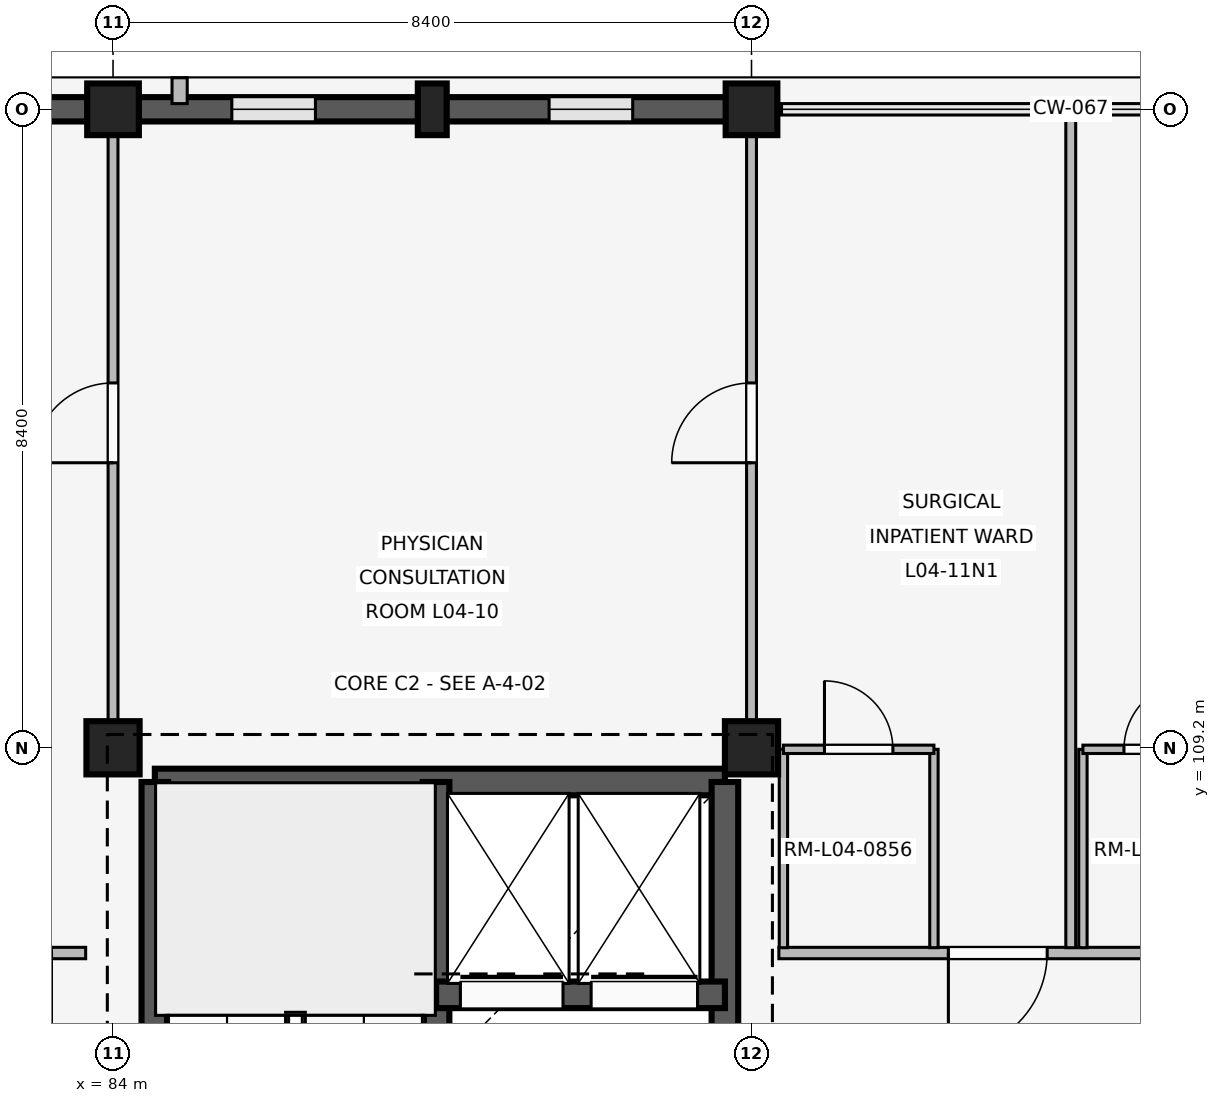
"""IFC4 building model, lengths in metres.
Left out: names, types, materials, properties, quantities, classifications, styles, units other than length and angle.
Written with IfcOpenShell. Run it as: python <this file> out.ifc"""

import sys

from ifc_helpers import new_model, si_unit, direction, frame, frame_2d, origin, origin_2d, place, context, subcontext, project, spatial, rectangle, extrude, element, fill, save


model = new_model("IFC4")
c1 = context("Model", 3, precision=1e-05, world=origin(), true_north=direction((0.0, 1.0)))
c2 = subcontext(c1, "Body", "Model", "MODEL_VIEW")
j1 = project(units=[si_unit("LENGTHUNIT", "METRE"), si_unit("PLANEANGLEUNIT", "RADIAN")], contexts=[c1])
p1 = place(None, origin())
s1 = spatial("IfcSite", under=j1, at=p1, CompositionType="ELEMENT")
p2 = place(p1, origin())
s2 = spatial("IfcBuilding", under=s1, at=p2, CompositionType="ELEMENT")
p3 = place(p2, frame((0.0, 0.0, 16.2)))
s3 = spatial("IfcBuildingStorey", under=s2, at=p3, CompositionType="ELEMENT", Elevation=16.2)
p4 = place(p3, frame((84.0, 109.2, 0.0), z_axis=(0.0, 0.0, 1.0), x_axis=(1.0, 0.0, 0.0)))
e1 = element("IfcColumn", 1, at=p4, inside=s3, PredefinedType="COLUMN", context=c2, shape_type="SweptSolid", body=[
    extrude(rectangle(XDim=0.7, YDim=0.7, at=origin_2d()), origin(), (0.0, 0.0, 1.0), 4.2),
])
p5 = place(p3, frame((84.0, 117.6, 0.0), z_axis=(0.0, 0.0, 1.0), x_axis=(1.0, 0.0, 0.0)))
e2 = element("IfcColumn", 2, at=p5, inside=s3, PredefinedType="COLUMN", context=c2, shape_type="SweptSolid", body=[
    extrude(rectangle(XDim=0.68, YDim=0.68, at=origin_2d()), origin(), (0.0, 0.0, 1.0), 4.2),
])
p6 = place(p3, frame((92.4, 109.2, 0.0), z_axis=(0.0, 0.0, 1.0), x_axis=(1.0, 0.0, 0.0)))
e3 = element("IfcColumn", 3, at=p6, inside=s3, PredefinedType="COLUMN", context=c2, shape_type="SweptSolid", body=[
    extrude(rectangle(XDim=0.7, YDim=0.7, at=origin_2d()), origin(), (0.0, 0.0, 1.0), 4.2),
])
p7 = place(p3, frame((92.4, 117.6, 0.0), z_axis=(0.0, 0.0, 1.0), x_axis=(1.0, 0.0, 0.0)))
e4 = element("IfcColumn", 4, at=p7, inside=s3, PredefinedType="COLUMN", context=c2, shape_type="SweptSolid", body=[
    extrude(rectangle(XDim=0.68, YDim=0.68, at=origin_2d()), origin(), (0.0, 0.0, 1.0), 4.2),
])
p8 = place(p3, frame((88.2, 117.6, 0.0), z_axis=(0.0, 0.0, 1.0), x_axis=(1.0, 0.0, 0.0)))
e5 = element("IfcColumn", 5, at=p8, inside=s3, PredefinedType="PILASTER", context=c2, shape_type="SweptSolid", body=[
    extrude(rectangle(XDim=0.38, YDim=0.68, at=origin_2d()), origin(), (0.0, 0.0, 1.0), 4.2),
])
p9 = place(p3, frame((75.935, 117.6, 0.0), z_axis=(0.0, 0.0, 1.0), x_axis=(1.0, 0.0, 0.0)))
e6 = element("IfcWall", 6, at=p9, inside=s3, PredefinedType="SOLIDWALL", context=c2, shape_type="SweptSolid", body=[
    extrude(rectangle(XDim=7.73, YDim=0.32, at=frame_2d((3.865, 0.0))), origin(), (0.0, 0.0, 1.0), 3.32),
])
p10 = place(p9, frame((1.303, 0.0, 0.85)))
e7 = element("IfcOpeningElement", 7, at=p10, cuts=e6, PredefinedType="OPENING", context=c2, shape_type="SweptSolid", body=[
    extrude(rectangle(XDim=0.95, YDim=1.6, at=frame_2d((0.475, 0.8))), frame((0.0, 0.17, 0.0), z_axis=(0.0, -1.0, 0.0), x_axis=(1.0, 0.0, 0.0)), (0.0, 0.0, 1.0), 0.34),
])
p11 = place(p9, frame((5.477, 0.0, 0.85)))
e8 = element("IfcOpeningElement", 8, at=p11, cuts=e6, PredefinedType="OPENING", context=c2, shape_type="SweptSolid", body=[
    extrude(rectangle(XDim=0.95, YDim=1.6, at=frame_2d((0.475, 0.8))), frame((0.0, 0.17, 0.0), z_axis=(0.0, -1.0, 0.0), x_axis=(1.0, 0.0, 0.0)), (0.0, 0.0, 1.0), 0.34),
])
p12 = place(p3, frame((84.335, 117.6, 0.0), z_axis=(0.0, 0.0, 1.0), x_axis=(1.0, 0.0, 0.0)))
e9 = element("IfcWall", 9, at=p12, inside=s3, PredefinedType="SOLIDWALL", context=c2, shape_type="SweptSolid", body=[
    extrude(rectangle(XDim=7.73, YDim=0.32, at=frame_2d((3.865, 0.0))), origin(), (0.0, 0.0, 1.0), 3.32),
])
p13 = place(p12, frame((1.228, 0.0, 0.85)))
e10 = element("IfcOpeningElement", 10, at=p13, cuts=e9, PredefinedType="OPENING", context=c2, shape_type="SweptSolid", body=[
    extrude(rectangle(XDim=1.1, YDim=1.6, at=frame_2d((0.55, 0.8))), frame((0.0, 0.17, 0.0), z_axis=(0.0, -1.0, 0.0), x_axis=(1.0, 0.0, 0.0)), (0.0, 0.0, 1.0), 0.34),
])
p14 = place(p12, frame((5.402, 0.0, 0.85)))
e11 = element("IfcOpeningElement", 11, at=p14, cuts=e9, PredefinedType="OPENING", context=c2, shape_type="SweptSolid", body=[
    extrude(rectangle(XDim=1.1, YDim=1.6, at=frame_2d((0.55, 0.8))), frame((0.0, 0.17, 0.0), z_axis=(0.0, -1.0, 0.0), x_axis=(1.0, 0.0, 0.0)), (0.0, 0.0, 1.0), 0.34),
])
p15 = place(p3, frame((84.876, 117.675, 0.0), z_axis=(0.0, 0.0, 1.0), x_axis=(0.0, 1.0, 0.0)))
e12 = element("IfcWall", 12, at=p15, inside=s3, PredefinedType="ELEMENTEDWALL", context=c2, shape_type="SweptSolid", body=[
    extrude(rectangle(XDim=0.34, YDim=0.2, at=frame_2d((0.17, 0.0))), origin(), (0.0, 0.0, 1.0), 3.3),
])
p16 = place(p3, frame((84.55, 108.75, 0.0), z_axis=(0.0, 0.0, 1.0), x_axis=(1.0, 0.0, 0.0)))
e13 = element("IfcWall", 13, at=p16, inside=s3, PredefinedType="SHEAR", context=c2, shape_type="SweptSolid", body=[
    extrude(rectangle(XDim=7.5, YDim=0.35, at=frame_2d((3.75, 0.0))), origin(), (0.0, 0.0, 1.0), 3.92),
])
p17 = place(p3, frame((84.55, 101.2, 0.0), z_axis=(0.0, 0.0, 1.0), x_axis=(0.0, 1.0, 0.0)))
e14 = element("IfcWall", 14, at=p17, inside=s3, PredefinedType="SHEAR", context=c2, shape_type="SweptSolid", body=[
    extrude(rectangle(XDim=7.55, YDim=0.35, at=frame_2d((3.775, 0.0))), origin(), (0.0, 0.0, 1.0), 3.92),
])
p18 = place(p17, frame((0.28, 0.0, 0.0)))
e15 = element("IfcOpeningElement", 15, at=p18, cuts=e14, PredefinedType="OPENING", context=c2, shape_type="SweptSolid", body=[
    extrude(rectangle(XDim=1.0, YDim=2.15, at=frame_2d((0.5, 1.075))), frame((0.0, 0.185, 0.0), z_axis=(0.0, -1.0, 0.0), x_axis=(1.0, 0.0, 0.0)), (0.0, 0.0, 1.0), 0.37),
])
p19 = place(p3, frame((92.05, 101.2, 0.0), z_axis=(0.0, 0.0, 1.0), x_axis=(0.0, 1.0, 0.0)))
e16 = element("IfcWall", 16, at=p19, inside=s3, PredefinedType="SHEAR", context=c2, shape_type="SweptSolid", body=[
    extrude(rectangle(XDim=7.55, YDim=0.35, at=frame_2d((3.775, 0.0))), origin(), (0.0, 0.0, 1.0), 3.92),
])
p20 = place(p19, frame((2.4, 0.0, 0.0)))
e17 = element("IfcOpeningElement", 17, at=p20, cuts=e16, PredefinedType="OPENING", context=c2, shape_type="SweptSolid", body=[
    extrude(rectangle(XDim=1.2, YDim=2.2, at=frame_2d((0.6, 1.1))), frame((0.0, 0.185, 0.0), z_axis=(0.0, -1.0, 0.0), x_axis=(1.0, 0.0, 0.0)), (0.0, 0.0, 1.0), 0.37),
])
p21 = place(p3, frame((88.25, 101.2, 0.0), z_axis=(0.0, 0.0, 1.0), x_axis=(0.0, 1.0, 0.0)))
e18 = element("IfcWall", 18, at=p21, inside=s3, PredefinedType="SHEAR", context=c2, shape_type="SweptSolid", body=[
    extrude(rectangle(XDim=7.55, YDim=0.35, at=frame_2d((3.775, 0.0))), origin(), (0.0, 0.0, 1.0), 3.92),
])
p22 = place(p21, frame((0.28, 0.0, 0.0)))
e19 = element("IfcOpeningElement", 19, at=p22, cuts=e18, PredefinedType="OPENING", context=c2, shape_type="SweptSolid", body=[
    extrude(rectangle(XDim=1.0, YDim=2.15, at=frame_2d((0.5, 1.075))), frame((0.0, 0.185, 0.0), z_axis=(0.0, -1.0, 0.0), x_axis=(1.0, 0.0, 0.0)), (0.0, 0.0, 1.0), 0.37),
])
p23 = place(p3, frame((88.25, 105.95, 0.0), z_axis=(0.0, 0.0, 1.0), x_axis=(1.0, 0.0, 0.0)))
e20 = element("IfcWall", 20, at=p23, inside=s3, PredefinedType="SHEAR", context=c2, shape_type="SweptSolid", body=[
    extrude(rectangle(XDim=3.8, YDim=0.35, at=frame_2d((1.9, 0.0))), origin(), (0.0, 0.0, 1.0), 3.92),
])
p24 = place(p23, frame((0.32, 0.0, 0.0)))
e21 = element("IfcOpeningElement", 21, at=p24, cuts=e20, PredefinedType="OPENING", context=c2, shape_type="SweptSolid", body=[
    extrude(rectangle(XDim=1.35, YDim=2.25, at=frame_2d((0.675, 1.125))), frame((0.0, 0.185, 0.0), z_axis=(0.0, -1.0, 0.0), x_axis=(1.0, 0.0, 0.0)), (0.0, 0.0, 1.0), 0.37),
])
p25 = place(p23, frame((2.04, 0.0, 0.0)))
e22 = element("IfcOpeningElement", 22, at=p25, cuts=e20, PredefinedType="OPENING", context=c2, shape_type="SweptSolid", body=[
    extrude(rectangle(XDim=1.4, YDim=2.25, at=frame_2d((0.7, 1.125))), frame((0.0, 0.185, 0.0), z_axis=(0.0, -1.0, 0.0), x_axis=(1.0, 0.0, 0.0)), (0.0, 0.0, 1.0), 0.37),
])
p26 = place(p3, frame((83.64, 106.5, 0.0), z_axis=(0.0, 0.0, 1.0), x_axis=(-1.0, 0.0, 0.0)))
e23 = element("IfcWall", 23, at=p26, inside=s3, PredefinedType="PARTITIONING", context=c2, shape_type="SweptSolid", body=[
    extrude(rectangle(XDim=7.96, YDim=0.15, at=frame_2d((3.98, 0.0))), origin(), (0.0, 0.0, 1.0), 3.3),
])
p27 = place(p26, frame((0.45, 0.0, 0.0)))
e24 = element("IfcOpeningElement", 24, at=p27, cuts=e23, PredefinedType="OPENING", context=c2, shape_type="SweptSolid", body=[
    extrude(rectangle(XDim=1.3, YDim=2.25, at=frame_2d((0.65, 1.125))), frame((0.0, 0.085, 0.0), z_axis=(0.0, -1.0, 0.0), x_axis=(1.0, 0.0, 0.0)), (0.0, 0.0, 1.0), 0.17),
])
p28 = place(p26, frame((4.15, 0.0, 0.0)))
e25 = element("IfcOpeningElement", 25, at=p28, cuts=e23, PredefinedType="OPENING", context=c2, shape_type="SweptSolid", body=[
    extrude(rectangle(XDim=1.3, YDim=2.25, at=frame_2d((0.65, 1.125))), frame((0.0, 0.085, 0.0), z_axis=(0.0, -1.0, 0.0), x_axis=(1.0, 0.0, 0.0)), (0.0, 0.0, 1.0), 0.17),
])
p29 = place(p3, frame((84.0, 109.55, 0.0), z_axis=(0.0, 0.0, 1.0), x_axis=(0.0, 1.0, 0.0)))
e26 = element("IfcWall", 26, at=p29, inside=s3, PredefinedType="PARTITIONING", context=c2, shape_type="SweptSolid", body=[
    extrude(rectangle(XDim=7.91, YDim=0.13, at=frame_2d((3.955, 0.0))), origin(), (0.0, 0.0, 1.0), 3.3),
])
p30 = place(p29, frame((3.4, 0.0, 0.0)))
e27 = element("IfcOpeningElement", 27, at=p30, cuts=e26, PredefinedType="OPENING", context=c2, shape_type="SweptSolid", body=[
    extrude(rectangle(XDim=1.05, YDim=2.2, at=frame_2d((0.525, 1.1))), frame((0.0, 0.075, 0.0), z_axis=(0.0, -1.0, 0.0), x_axis=(1.0, 0.0, 0.0)), (0.0, 0.0, 1.0), 0.15),
])
p31 = place(p3, frame((92.4, 109.55, 0.0), z_axis=(0.0, 0.0, 1.0), x_axis=(0.0, 1.0, 0.0)))
e28 = element("IfcWall", 28, at=p31, inside=s3, PredefinedType="PARTITIONING", context=c2, shape_type="SweptSolid", body=[
    extrude(rectangle(XDim=7.91, YDim=0.13, at=frame_2d((3.955, 0.0))), origin(), (0.0, 0.0, 1.0), 3.3),
])
p32 = place(p31, frame((3.4, 0.0, 0.0)))
e29 = element("IfcOpeningElement", 29, at=p32, cuts=e28, PredefinedType="OPENING", context=c2, shape_type="SweptSolid", body=[
    extrude(rectangle(XDim=1.05, YDim=2.2, at=frame_2d((0.525, 1.1))), frame((0.0, 0.075, 0.0), z_axis=(0.0, -1.0, 0.0), x_axis=(1.0, 0.0, 0.0)), (0.0, 0.0, 1.0), 0.15),
])
p33 = place(p3, frame((100.72, 106.5, 0.0), z_axis=(0.0, 0.0, 1.0), x_axis=(-1.0, 0.0, 0.0)))
e30 = element("IfcWall", 30, at=p33, inside=s3, PredefinedType="PARTITIONING", context=c2, shape_type="SweptSolid", body=[
    extrude(rectangle(XDim=7.96, YDim=0.15, at=frame_2d((3.98, 0.0))), origin(), (0.0, 0.0, 1.0), 3.3),
])
p34 = place(p33, frame((0.73, 0.0, 0.0)))
e31 = element("IfcOpeningElement", 31, at=p34, cuts=e30, PredefinedType="OPENING", context=c2, shape_type="SweptSolid", body=[
    extrude(rectangle(XDim=1.3, YDim=2.25, at=frame_2d((0.65, 1.125))), frame((0.0, 0.085, 0.0), z_axis=(0.0, -1.0, 0.0), x_axis=(1.0, 0.0, 0.0)), (0.0, 0.0, 1.0), 0.17),
])
p35 = place(p33, frame((4.43, 0.0, 0.0)))
e32 = element("IfcOpeningElement", 32, at=p35, cuts=e30, PredefinedType="OPENING", context=c2, shape_type="SweptSolid", body=[
    extrude(rectangle(XDim=1.3, YDim=2.25, at=frame_2d((0.65, 1.125))), frame((0.0, 0.085, 0.0), z_axis=(0.0, -1.0, 0.0), x_axis=(1.0, 0.0, 0.0)), (0.0, 0.0, 1.0), 0.17),
])
p36 = place(p3, frame((96.6, 106.57, 0.0), z_axis=(0.0, 0.0, 1.0), x_axis=(0.0, 1.0, 0.0)))
e33 = element("IfcWall", 33, at=p36, inside=s3, PredefinedType="PARTITIONING", context=c2, shape_type="SweptSolid", body=[
    extrude(rectangle(XDim=10.93, YDim=0.13, at=frame_2d((5.465, 0.0))), origin(), (0.0, 0.0, 1.0), 3.3),
])
for number, where, z_axis, x_axis in (
    (34, (92.82, 106.57, 0.0), (0.0, 0.0, 1.0), (0.0, 1.0, 0.0)),
    (35, (94.8, 106.57, 0.0), (0.0, 0.0, 1.0), (0.0, 1.0, 0.0)),
):
    element("IfcWall", number, at=place(p3, frame(where, z_axis=z_axis, x_axis=x_axis)), inside=s3, PredefinedType="PARTITIONING", context=c2, shape_type="SweptSolid", body=[
        extrude(rectangle(XDim=2.61, YDim=0.11, at=frame_2d((1.305, 0.0))), origin(), (0.0, 0.0, 1.0), 3.3),
    ])
p37 = place(p3, frame((92.82, 109.18, 0.0), z_axis=(0.0, 0.0, 1.0), x_axis=(1.0, 0.0, 0.0)))
e36 = element("IfcWall", 36, at=p37, inside=s3, PredefinedType="PARTITIONING", context=c2, shape_type="SweptSolid", body=[
    extrude(rectangle(XDim=1.98, YDim=0.11, at=frame_2d((0.99, 0.0))), origin(), (0.0, 0.0, 1.0), 3.3),
])
p38 = place(p37, frame((0.54, 0.0, 0.0)))
e37 = element("IfcOpeningElement", 37, at=p38, cuts=e36, PredefinedType="OPENING", context=c2, shape_type="SweptSolid", body=[
    extrude(rectangle(XDim=0.9, YDim=2.1, at=frame_2d((0.45, 1.05))), frame((0.0, 0.065, 0.0), z_axis=(0.0, -1.0, 0.0), x_axis=(1.0, 0.0, 0.0)), (0.0, 0.0, 1.0), 0.13),
])
p39 = place(p3, frame((96.76, 106.57, 0.0), z_axis=(0.0, 0.0, 1.0), x_axis=(0.0, 1.0, 0.0)))
e38 = element("IfcWall", 38, at=p39, inside=s3, PredefinedType="PARTITIONING", context=c2, shape_type="SweptSolid", body=[
    extrude(rectangle(XDim=2.61, YDim=0.11, at=frame_2d((1.305, 0.0))), origin(), (0.0, 0.0, 1.0), 3.3),
])
p40 = place(p3, frame((96.76, 109.18, 0.0), z_axis=(0.0, 0.0, 1.0), x_axis=(1.0, 0.0, 0.0)))
e39 = element("IfcWall", 39, at=p40, inside=s3, PredefinedType="PARTITIONING", context=c2, shape_type="SweptSolid", body=[
    extrude(rectangle(XDim=1.98, YDim=0.11, at=frame_2d((0.99, 0.0))), origin(), (0.0, 0.0, 1.0), 3.3),
])
p41 = place(p40, frame((0.54, 0.0, 0.0)))
e40 = element("IfcOpeningElement", 40, at=p41, cuts=e39, PredefinedType="OPENING", context=c2, shape_type="SweptSolid", body=[
    extrude(rectangle(XDim=0.9, YDim=2.1, at=frame_2d((0.45, 1.05))), frame((0.0, 0.065, 0.0), z_axis=(0.0, -1.0, 0.0), x_axis=(1.0, 0.0, 0.0)), (0.0, 0.0, 1.0), 0.13),
])
p42 = place(p13, origin())
e41 = element("IfcWindow", 41, at=p42, inside=s3, PartitioningType="SINGLE_PANEL", PredefinedType="WINDOW", context=c2, shape_type="SweptSolid", body=[
    extrude(rectangle(XDim=1.1, YDim=1.6, at=frame_2d((0.55, 0.8))), frame((0.0, 0.03, 0.0), z_axis=(0.0, -1.0, 0.0), x_axis=(1.0, 0.0, 0.0)), (0.0, 0.0, 1.0), 0.06),
])
fill(e10, e41)
p43 = place(p14, origin())
e42 = element("IfcWindow", 42, at=p43, inside=s3, PartitioningType="SINGLE_PANEL", PredefinedType="WINDOW", context=c2, shape_type="SweptSolid", body=[
    extrude(rectangle(XDim=1.1, YDim=1.6, at=frame_2d((0.55, 0.8))), frame((0.0, 0.03, 0.0), z_axis=(0.0, -1.0, 0.0), x_axis=(1.0, 0.0, 0.0)), (0.0, 0.0, 1.0), 0.06),
])
fill(e11, e42)
p44 = place(p24, origin())
e43 = element("IfcDoor", 43, at=p44, inside=s3, OperationType="SLIDING_TO_LEFT", PredefinedType="DOOR", context=c2, shape_type="SweptSolid", body=[
    extrude(rectangle(XDim=1.35, YDim=2.25, at=frame_2d((0.675, 1.125))), frame((0.0, 0.025, 0.0), z_axis=(0.0, -1.0, 0.0), x_axis=(1.0, 0.0, 0.0)), (0.0, 0.0, 1.0), 0.05),
])
fill(e21, e43)
p45 = place(p25, origin())
e44 = element("IfcDoor", 44, at=p45, inside=s3, OperationType="SLIDING_TO_LEFT", PredefinedType="DOOR", context=c2, shape_type="SweptSolid", body=[
    extrude(rectangle(XDim=1.4, YDim=2.25, at=frame_2d((0.7, 1.125))), frame((0.0, 0.025, 0.0), z_axis=(0.0, -1.0, 0.0), x_axis=(1.0, 0.0, 0.0)), (0.0, 0.0, 1.0), 0.05),
])
fill(e22, e44)
p46 = place(p30, origin())
e45 = element("IfcDoor", 45, at=p46, inside=s3, OperationType="SINGLE_SWING_LEFT", PredefinedType="DOOR", context=c2, shape_type="SweptSolid", body=[
    extrude(rectangle(XDim=1.05, YDim=2.2, at=frame_2d((0.525, 1.1))), frame((0.0, 0.025, 0.0), z_axis=(0.0, -1.0, 0.0), x_axis=(1.0, 0.0, 0.0)), (0.0, 0.0, 1.0), 0.05),
])
fill(e27, e45)
p47 = place(p32, origin())
e46 = element("IfcDoor", 46, at=p47, inside=s3, OperationType="SINGLE_SWING_LEFT", PredefinedType="DOOR", context=c2, shape_type="SweptSolid", body=[
    extrude(rectangle(XDim=1.05, YDim=2.2, at=frame_2d((0.525, 1.1))), frame((0.0, 0.025, 0.0), z_axis=(0.0, -1.0, 0.0), x_axis=(1.0, 0.0, 0.0)), (0.0, 0.0, 1.0), 0.05),
])
fill(e29, e46)
p48 = place(p35, origin())
e47 = element("IfcDoor", 47, at=p48, inside=s3, OperationType="SINGLE_SWING_RIGHT", PredefinedType="DOOR", context=c2, shape_type="SweptSolid", body=[
    extrude(rectangle(XDim=1.3, YDim=2.25, at=frame_2d((0.65, 1.125))), frame((0.0, 0.025, 0.0), z_axis=(0.0, -1.0, 0.0), x_axis=(1.0, 0.0, 0.0)), (0.0, 0.0, 1.0), 0.05),
])
fill(e32, e47)
p49 = place(p38, origin())
e48 = element("IfcDoor", 48, at=p49, inside=s3, OperationType="SINGLE_SWING_LEFT", PredefinedType="DOOR", context=c2, shape_type="SweptSolid", body=[
    extrude(rectangle(XDim=0.9, YDim=2.1, at=frame_2d((0.45, 1.05))), frame((0.0, 0.025, 0.0), z_axis=(0.0, -1.0, 0.0), x_axis=(1.0, 0.0, 0.0)), (0.0, 0.0, 1.0), 0.05),
])
fill(e37, e48)
p50 = place(p41, origin())
e49 = element("IfcDoor", 49, at=p50, inside=s3, OperationType="SINGLE_SWING_RIGHT", PredefinedType="DOOR", context=c2, shape_type="SweptSolid", body=[
    extrude(rectangle(XDim=0.9, YDim=2.1, at=frame_2d((0.45, 1.05))), frame((0.0, 0.025, 0.0), z_axis=(0.0, -1.0, 0.0), x_axis=(1.0, 0.0, 0.0)), (0.0, 0.0, 1.0), 0.05),
])
fill(e40, e49)
save(model, sys.argv[1])
